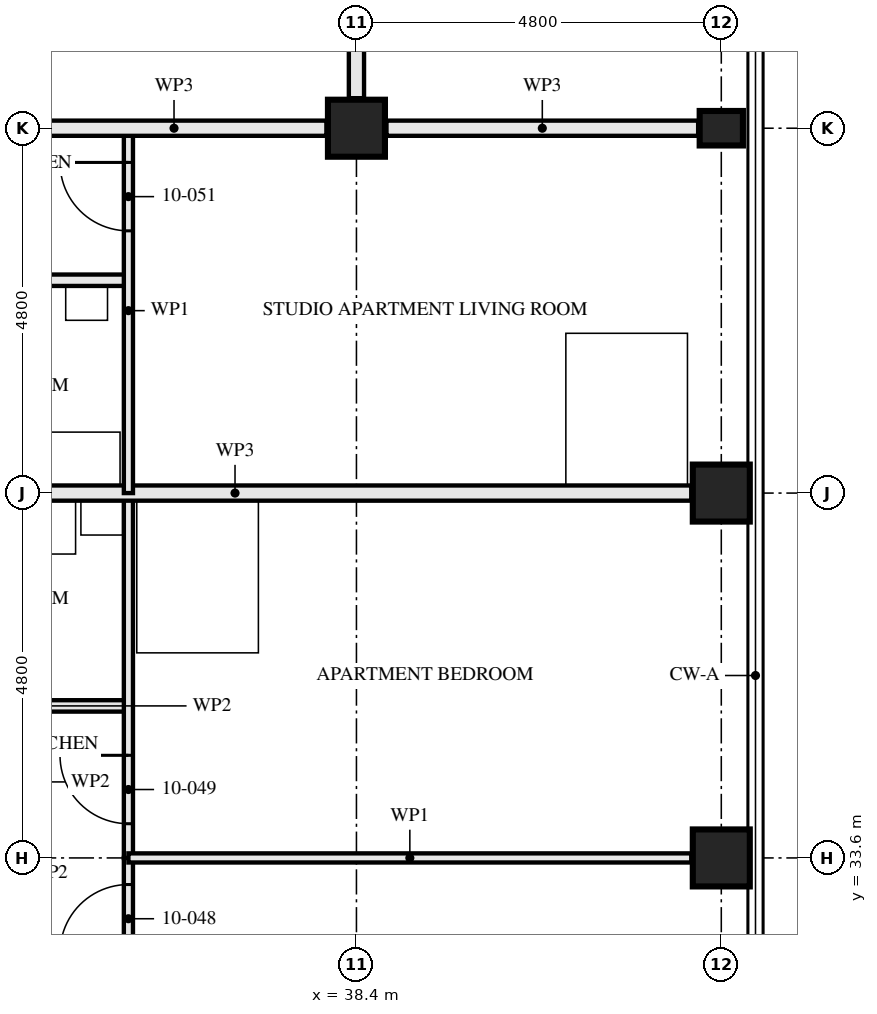
"""IFC4 building model, lengths in metres.
Left out: names, types, materials, properties, quantities, classifications, styles, units other than length and angle.
Written with IfcOpenShell. Run it as: python <this file> out.ifc"""

import sys

from ifc_helpers import new_model, si_unit, direction, frame, frame_2d, origin, origin_2d, place, context, subcontext, project, spatial, rectangle, hollow_rectangle, i_section, extrude, element, fill, save


model = new_model("IFC4")
c1 = context("Model", 3, precision=1e-05, world=origin(), true_north=direction((0.0, 1.0)))
c2 = subcontext(c1, "Body", "Model", "MODEL_VIEW")
j1 = project(units=[si_unit("LENGTHUNIT", "METRE"), si_unit("PLANEANGLEUNIT", "RADIAN")], contexts=[c1])
p1 = place(None, origin())
s1 = spatial("IfcSite", under=j1, at=p1, CompositionType="ELEMENT")
p2 = place(p1, origin())
s2 = spatial("IfcBuilding", under=s1, at=p2, CompositionType="ELEMENT")
p3 = place(p2, frame((0.0, 0.0, 41.0)))
s3 = spatial("IfcBuildingStorey", under=s2, at=p3, CompositionType="ELEMENT", Elevation=41.0)
for number, where, z_axis, x_axis in (
    (1, (38.4, 43.2, 0.0), (0.0, 0.0, 1.0), (0.0, 1.0, 0.0)),
    (2, (43.2, 33.6, 0.0), (0.0, 0.0, 1.0), (1.0, 0.0, 0.0)),
    (3, (43.2, 38.4, 0.0), (0.0, 0.0, 1.0), (1.0, 0.0, 0.0)),
):
    element("IfcColumn", number, at=place(p3, frame(where, z_axis=z_axis, x_axis=x_axis)), inside=s3, PredefinedType="COLUMN", context=c2, shape_type="SweptSolid", body=[
        extrude(hollow_rectangle(XDim=0.75, YDim=0.75, WallThickness=0.08, at=origin_2d()), origin(), (0.0, 0.0, 1.0), 3.5),
    ])
p4 = place(p3, frame((43.2, 43.2, 0.0), z_axis=(0.0, 0.0, 1.0), x_axis=(0.0, 1.0, 0.0)))
e4 = element("IfcColumn", 4, at=p4, inside=s3, PredefinedType="COLUMN", context=c2, shape_type="SweptSolid", body=[
    extrude(i_section(OverallWidth=0.454, OverallDepth=0.569, WebThickness=0.078, FlangeThickness=0.125, FilletRadius=0.015, at=origin_2d()), origin(), (0.0, 0.0, 1.0), 3.5),
])
p5 = place(p3, frame((35.4, 35.6, 0.0), z_axis=(0.0, 0.0, 1.0), x_axis=(-1.0, 0.0, 0.0)))
e5 = element("IfcWall", 5, at=p5, inside=s3, PredefinedType="PARTITIONING", context=c2, shape_type="SweptSolid", body=[
    extrude(rectangle(XDim=3.0, YDim=0.15, at=frame_2d((1.5, 0.0))), origin(), (0.0, 0.0, 1.0), 3.33),
])
p6 = place(p5, frame((1.05, 0.0, 0.0)))
e6 = element("IfcOpeningElement", 6, at=p6, cuts=e5, PredefinedType="OPENING", context=c2, shape_type="SweptSolid", body=[
    extrude(rectangle(XDim=0.9, YDim=2.1, at=frame_2d((0.45, 1.05))), frame((0.0, 0.085, 0.0), z_axis=(0.0, -1.0, 0.0), x_axis=(1.0, 0.0, 0.0)), (0.0, 0.0, 1.0), 0.171),
])
p7 = place(p3, frame((35.4, 32.2, 0.0), z_axis=(0.0, 0.0, 1.0), x_axis=(0.0, 1.0, 0.0)))
e7 = element("IfcWall", 7, at=p7, inside=s3, PredefinedType="PARTITIONING", context=c2, shape_type="SweptSolid", body=[
    extrude(rectangle(XDim=1.4, YDim=0.12, at=frame_2d((0.7, 0.0))), origin(), (0.0, 0.0, 1.0), 3.33),
])
p8 = place(p7, frame((0.15, 0.0, 0.0)))
e8 = element("IfcOpeningElement", 8, at=p8, cuts=e7, PredefinedType="OPENING", context=c2, shape_type="SweptSolid", body=[
    extrude(rectangle(XDim=0.9, YDim=2.1, at=frame_2d((0.45, 1.05))), frame((0.0, 0.071, 0.0), z_axis=(0.0, -1.0, 0.0), x_axis=(1.0, 0.0, 0.0)), (0.0, 0.0, 1.0), 0.141),
])
p9 = place(p3, frame((35.4, 33.6, 0.0), z_axis=(0.0, 0.0, 1.0), x_axis=(0.0, 1.0, 0.0)))
e9 = element("IfcWall", 9, at=p9, inside=s3, PredefinedType="PARTITIONING", context=c2, shape_type="SweptSolid", body=[
    extrude(rectangle(XDim=4.8, YDim=0.12, at=frame_2d((2.4, 0.0))), origin(), (0.0, 0.0, 1.0), 3.33),
])
p10 = place(p9, frame((0.45, 0.0, 0.0)))
e10 = element("IfcOpeningElement", 10, at=p10, cuts=e9, PredefinedType="OPENING", context=c2, shape_type="SweptSolid", body=[
    extrude(rectangle(XDim=0.9, YDim=2.1, at=frame_2d((0.45, 1.05))), frame((0.0, 0.071, 0.0), z_axis=(0.0, -1.0, 0.0), x_axis=(1.0, 0.0, 0.0)), (0.0, 0.0, 1.0), 0.141),
])
p11 = place(p3, frame((42.805, 33.6, 0.0), z_axis=(0.0, 0.0, 1.0), x_axis=(-1.0, 0.0, 0.0)))
e11 = element("IfcWall", 11, at=p11, inside=s3, PredefinedType="PARTITIONING", context=c2, shape_type="SweptSolid", body=[
    extrude(rectangle(XDim=7.405, YDim=0.12, at=frame_2d((3.703, 0.0))), origin(), (0.0, 0.0, 1.0), 2.55),
])
p12 = place(p3, frame((42.805, 38.4, 0.0), z_axis=(0.0, 0.0, 1.0), x_axis=(-1.0, 0.0, 0.0)))
e12 = element("IfcWall", 12, at=p12, inside=s3, PredefinedType="PARTITIONING", context=c2, shape_type="SweptSolid", body=[
    extrude(rectangle(XDim=12.005, YDim=0.2, at=frame_2d((6.002, 0.0))), origin(), (0.0, 0.0, 1.0), 2.55),
])
p13 = place(p3, frame((35.4, 41.2, 0.0), z_axis=(0.0, 0.0, 1.0), x_axis=(-1.0, 0.0, 0.0)))
e13 = element("IfcWall", 13, at=p13, inside=s3, PredefinedType="PARTITIONING", context=c2, shape_type="SweptSolid", body=[
    extrude(rectangle(XDim=3.0, YDim=0.15, at=frame_2d((1.5, 0.0))), origin(), (0.0, 0.0, 1.0), 3.33),
])
p14 = place(p13, frame((1.05, 0.0, 0.0)))
e14 = element("IfcOpeningElement", 14, at=p14, cuts=e13, PredefinedType="OPENING", context=c2, shape_type="SweptSolid", body=[
    extrude(rectangle(XDim=0.9, YDim=2.1, at=frame_2d((0.45, 1.05))), frame((0.0, 0.085, 0.0), z_axis=(0.0, -1.0, 0.0), x_axis=(1.0, 0.0, 0.0)), (0.0, 0.0, 1.0), 0.171),
])
p15 = place(p3, frame((35.4, 38.4, 0.0), z_axis=(0.0, 0.0, 1.0), x_axis=(0.0, 1.0, 0.0)))
e15 = element("IfcWall", 15, at=p15, inside=s3, PredefinedType="PARTITIONING", context=c2, shape_type="SweptSolid", body=[
    extrude(rectangle(XDim=4.8, YDim=0.12, at=frame_2d((2.4, 0.0))), origin(), (0.0, 0.0, 1.0), 3.33),
])
p16 = place(p15, frame((3.45, 0.0, 0.0)))
e16 = element("IfcOpeningElement", 16, at=p16, cuts=e15, PredefinedType="OPENING", context=c2, shape_type="SweptSolid", body=[
    extrude(rectangle(XDim=0.9, YDim=2.1, at=frame_2d((0.45, 1.05))), frame((0.0, 0.071, 0.0), z_axis=(0.0, -1.0, 0.0), x_axis=(1.0, 0.0, 0.0)), (0.0, 0.0, 1.0), 0.141),
])
p17 = place(p3, frame((38.4, 45.2, 0.0), z_axis=(0.0, 0.0, 1.0), x_axis=(0.0, -1.0, 0.0)))
e17 = element("IfcWall", 17, at=p17, inside=s3, PredefinedType="PARTITIONING", context=c2, shape_type="SweptSolid", body=[
    extrude(rectangle(XDim=1.605, YDim=0.2, at=frame_2d((0.802, 0.0))), origin(), (0.0, 0.0, 1.0), 3.33),
])
p18 = place(p3, frame((42.896, 43.2, 0.0), z_axis=(0.0, 0.0, 1.0), x_axis=(-1.0, 0.0, 0.0)))
e18 = element("IfcWall", 18, at=p18, inside=s3, PredefinedType="PARTITIONING", context=c2, shape_type="SweptSolid", body=[
    extrude(rectangle(XDim=4.101, YDim=0.2, at=frame_2d((2.05, 0.0))), origin(), (0.0, 0.0, 1.0), 2.32),
])
p19 = place(p3, frame((38.005, 43.2, 0.0), z_axis=(0.0, 0.0, 1.0), x_axis=(-1.0, 0.0, 0.0)))
e19 = element("IfcWall", 19, at=p19, inside=s3, PredefinedType="PARTITIONING", context=c2, shape_type="SweptSolid", body=[
    extrude(rectangle(XDim=4.01, YDim=0.2, at=frame_2d((2.005, 0.0))), origin(), (0.0, 0.0, 1.0), 2.32),
])
p20 = place(p8, origin())
e20 = element("IfcDoor", 20, at=p20, inside=s3, OperationType="SINGLE_SWING_RIGHT", PredefinedType="DOOR", context=c2, shape_type="SweptSolid", body=[
    extrude(rectangle(XDim=0.9, YDim=2.1, at=frame_2d((0.45, 1.05))), frame((0.0, 0.022, 0.0), z_axis=(0.0, -1.0, 0.0), x_axis=(1.0, 0.0, 0.0)), (0.0, 0.0, 1.0), 0.044),
])
fill(e8, e20)
p21 = place(p10, origin())
e21 = element("IfcDoor", 21, at=p21, inside=s3, OperationType="SINGLE_SWING_LEFT", PredefinedType="DOOR", context=c2, shape_type="SweptSolid", body=[
    extrude(rectangle(XDim=0.9, YDim=2.1, at=frame_2d((0.45, 1.05))), frame((0.0, 0.022, 0.0), z_axis=(0.0, -1.0, 0.0), x_axis=(1.0, 0.0, 0.0)), (0.0, 0.0, 1.0), 0.044),
])
fill(e10, e21)
p22 = place(p16, origin())
e22 = element("IfcDoor", 22, at=p22, inside=s3, OperationType="SINGLE_SWING_LEFT", PredefinedType="DOOR", context=c2, shape_type="SweptSolid", body=[
    extrude(rectangle(XDim=0.9, YDim=2.1, at=frame_2d((0.45, 1.05))), frame((0.0, 0.022, 0.0), z_axis=(0.0, -1.0, 0.0), x_axis=(1.0, 0.0, 0.0)), (0.0, 0.0, 1.0), 0.044),
])
fill(e16, e22)
save(model, sys.argv[1])
